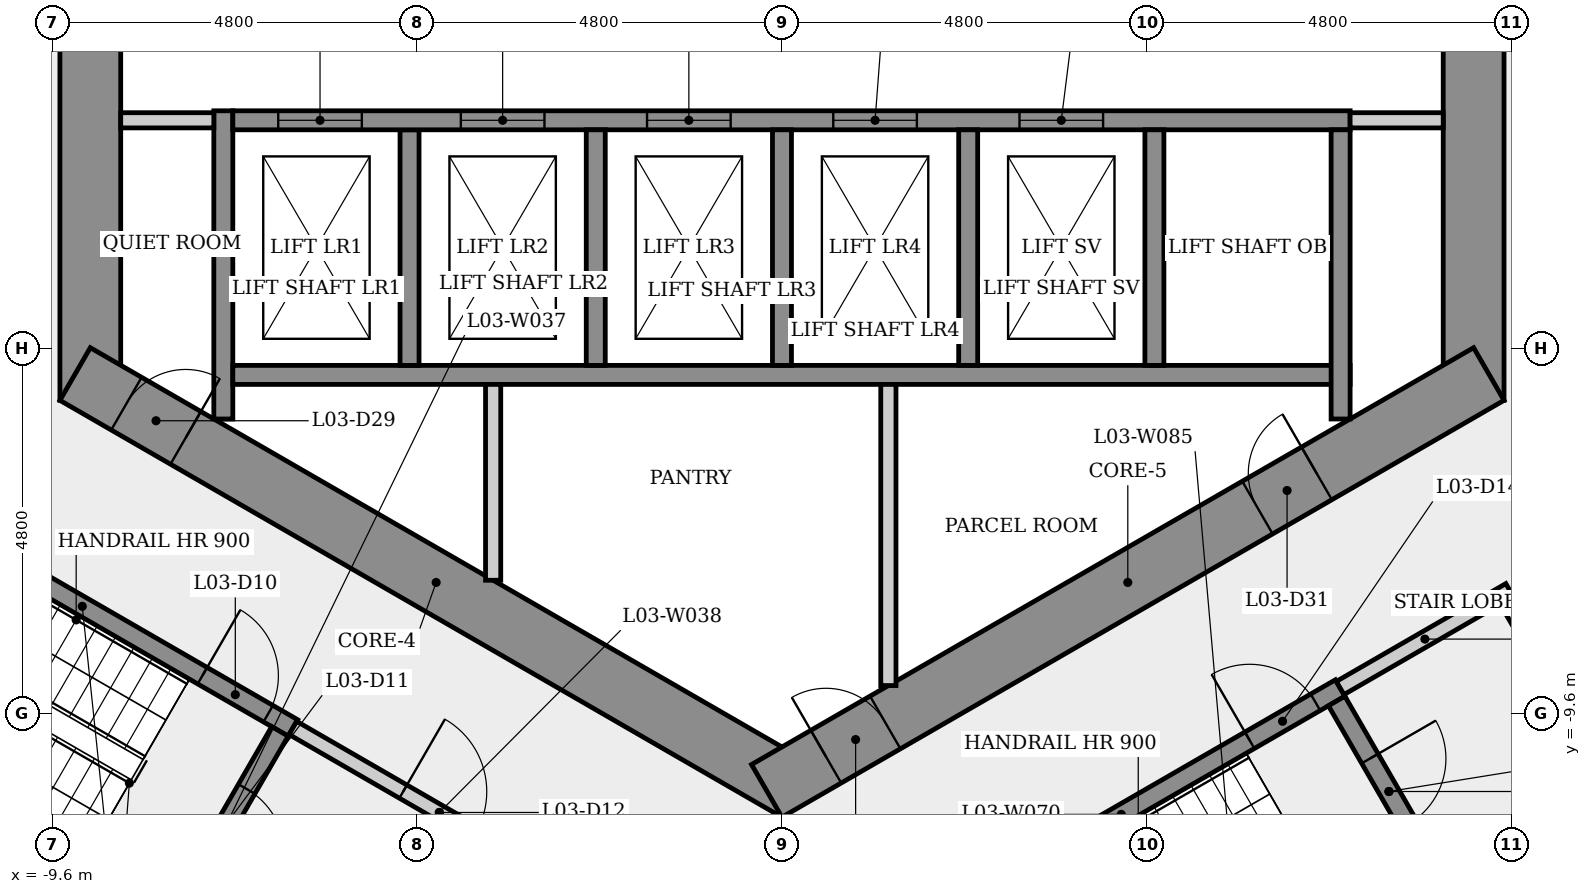
"""IFC4 building model, lengths in metres.
Left out: names, types, materials, properties, quantities, classifications, styles, units other than length and angle.
Written with IfcOpenShell. Run it as: python <this file> out.ifc"""

import sys

from ifc_helpers import new_model, si_unit, direction, frame, frame_2d, origin, place, context, subcontext, project, spatial, rectangle, extrude, element, fill, save


model = new_model("IFC4")
c1 = context("Model", 3, precision=1e-05, world=origin(), true_north=direction((0.0, 1.0)))
c2 = subcontext(c1, "Body", "Model", "MODEL_VIEW")
j1 = project(units=[si_unit("LENGTHUNIT", "METRE"), si_unit("PLANEANGLEUNIT", "RADIAN")], contexts=[c1])
p1 = place(None, origin())
s1 = spatial("IfcSite", under=j1, at=p1, CompositionType="ELEMENT")
p2 = place(p1, origin())
s2 = spatial("IfcBuilding", under=s1, at=p2, CompositionType="ELEMENT")
p3 = place(p2, frame((0.0, 0.0, 16.0)))
s3 = spatial("IfcBuildingStorey", under=s2, at=p3, CompositionType="ELEMENT", Elevation=16.0)
p4 = place(p3, frame((9.1, -5.485, 0.0), z_axis=(0.0, 0.0, 1.0), x_axis=(0.0, 1.0, 0.0)))
e1 = element("IfcWall", 1, at=p4, inside=s3, PredefinedType="SHEAR", context=c2, shape_type="SweptSolid", body=[
    extrude(rectangle(XDim=10.97, YDim=0.8, at=frame_2d((5.485, 0.0))), origin(), (0.0, 0.0, 1.0), 4.5),
])
p5 = place(p4, frame((4.685, 0.0, 0.0)))
e2 = element("IfcOpeningElement", 2, at=p5, cuts=e1, PredefinedType="OPENING", context=c2, shape_type="SweptSolid", body=[
    extrude(rectangle(XDim=1.6, YDim=2.1, at=frame_2d((0.8, 1.05))), frame((0.0, 0.41, 0.0), z_axis=(0.0, -1.0, 0.0), x_axis=(1.0, 0.0, 0.0)), (0.0, 0.0, 1.0), 0.82),
])
p6 = place(p3, frame((-9.1, 5.485, 0.0), z_axis=(0.0, 0.0, 1.0), x_axis=(0.0, -1.0, 0.0)))
e3 = element("IfcWall", 3, at=p6, inside=s3, PredefinedType="SHEAR", context=c2, shape_type="SweptSolid", body=[
    extrude(rectangle(XDim=10.97, YDim=0.8, at=frame_2d((5.485, 0.0))), origin(), (0.0, 0.0, 1.0), 4.5),
])
p7 = place(p6, frame((4.685, 0.0, 0.0)))
e4 = element("IfcOpeningElement", 4, at=p7, cuts=e3, PredefinedType="OPENING", context=c2, shape_type="SweptSolid", body=[
    extrude(rectangle(XDim=1.6, YDim=2.1, at=frame_2d((0.8, 1.05))), frame((0.0, 0.41, 0.0), z_axis=(0.0, -1.0, 0.0), x_axis=(1.0, 0.0, 0.0)), (0.0, 0.0, 1.0), 0.82),
])
p8 = place(p3, frame((-9.3, -5.138, 0.0), z_axis=(0.0, 0.0, 1.0), x_axis=(0.866023993627, -0.500002442456, 0.0)))
e5 = element("IfcWall", 5, at=p8, inside=s3, PredefinedType="SHEAR", context=c2, shape_type="SweptSolid", body=[
    extrude(rectangle(XDim=10.97, YDim=0.8, at=frame_2d((5.485, 0.0))), origin(), (0.0, 0.0, 1.0), 4.5),
])
p9 = place(p8, frame((0.78, 0.0, 0.0)))
e6 = element("IfcOpeningElement", 6, at=p9, cuts=e5, PredefinedType="OPENING", context=c2, shape_type="SweptSolid", body=[
    extrude(rectangle(XDim=0.9, YDim=2.1, at=frame_2d((0.45, 1.05))), frame((0.0, 0.41, 0.0), z_axis=(0.0, -1.0, 0.0), x_axis=(1.0, 0.0, 0.0)), (0.0, 0.0, 1.0), 0.82),
])
p10 = place(p3, frame((-0.2, -10.623, 0.0), z_axis=(0.0, 0.0, 1.0), x_axis=(0.866023993627, 0.500002442456, 0.0)))
e7 = element("IfcWall", 7, at=p10, inside=s3, PredefinedType="SHEAR", context=c2, shape_type="SweptSolid", body=[
    extrude(rectangle(XDim=10.97, YDim=0.8, at=frame_2d((5.485, 0.0))), origin(), (0.0, 0.0, 1.0), 4.5),
])
p11 = place(p10, frame((0.9, 0.0, 0.0)))
e8 = element("IfcOpeningElement", 8, at=p11, cuts=e7, PredefinedType="OPENING", context=c2, shape_type="SweptSolid", body=[
    extrude(rectangle(XDim=0.9, YDim=2.1, at=frame_2d((0.45, 1.05))), frame((0.0, 0.41, 0.0), z_axis=(0.0, -1.0, 0.0), x_axis=(1.0, 0.0, 0.0)), (0.0, 0.0, 1.0), 0.82),
])
p12 = place(p10, frame((7.455, 0.0, 0.0)))
e9 = element("IfcOpeningElement", 9, at=p12, cuts=e7, PredefinedType="OPENING", context=c2, shape_type="SweptSolid", body=[
    extrude(rectangle(XDim=0.9, YDim=2.1, at=frame_2d((0.45, 1.05))), frame((0.0, 0.41, 0.0), z_axis=(0.0, -1.0, 0.0), x_axis=(1.0, 0.0, 0.0)), (0.0, 0.0, 1.0), 0.82),
])
p13 = place(p3, frame((-11.977, -6.595, 0.0), z_axis=(0.0, 0.0, 1.0), x_axis=(0.866025499775, -0.499999833739, 0.0)))
e10 = element("IfcWall", 10, at=p13, inside=s3, PredefinedType="SHEAR", context=c2, shape_type="SweptSolid", body=[
    extrude(rectangle(XDim=6.4, YDim=0.25, at=frame_2d((3.2, 0.0))), origin(), (0.0, 0.0, 1.0), 4.05),
])
p14 = place(p13, frame((5.025, 0.0, 0.0)))
e11 = element("IfcOpeningElement", 11, at=p14, cuts=e10, PredefinedType="OPENING", context=c2, shape_type="SweptSolid", body=[
    extrude(rectangle(XDim=1.0, YDim=2.1, at=frame_2d((0.5, 1.05))), frame((0.0, 0.135, 0.0), z_axis=(0.0, -1.0, 0.0), x_axis=(1.0, 0.0, 0.0)), (0.0, 0.0, 1.0), 0.27),
])
p15 = place(p3, frame((-7.935, -12.393, 0.0), z_axis=(0.0, 0.0, 1.0), x_axis=(-0.866025499775, 0.499999833739, 0.0)))
e12 = element("IfcWall", 12, at=p15, inside=s3, PredefinedType="SHEAR", context=c2, shape_type="SweptSolid", body=[
    extrude(rectangle(XDim=6.4, YDim=0.25, at=frame_2d((3.2, 0.0))), origin(), (0.0, 0.0, 1.0), 4.05),
])
p16 = place(p3, frame((-7.35, -5.73, 0.0), z_axis=(0.0, 0.0, 1.0), x_axis=(0.0, 1.0, 0.0)))
e13 = element("IfcWall", 13, at=p16, inside=s3, PredefinedType="SHEAR", context=c2, shape_type="SweptSolid", body=[
    extrude(rectangle(XDim=4.055, YDim=0.25, at=frame_2d((2.028, 0.0))), origin(), (0.0, 0.0, 1.0), 4.05),
])
p17 = place(p3, frame((-7.475, -1.8, 0.0), z_axis=(0.0, 0.0, 1.0), x_axis=(-1.0, 0.0, 0.0)))
e14 = element("IfcWall", 14, at=p17, inside=s3, PredefinedType="PARTITIONING", context=c2, shape_type="SweptSolid", body=[
    extrude(rectangle(XDim=1.225, YDim=0.2, at=frame_2d((0.613, 0.0))), origin(), (0.0, 0.0, 1.0), 4.05),
])
p18 = place(p3, frame((-6.605, -9.841, 0.0), z_axis=(0.0, 0.0, 1.0), x_axis=(-0.499996545922, -0.866027397988, 0.0)))
e15 = element("IfcWall", 15, at=p18, inside=s3, PredefinedType="SHEAR", context=c2, shape_type="SweptSolid", body=[
    extrude(rectangle(XDim=2.75, YDim=0.25, at=frame_2d((1.375, 0.0))), origin(), (0.0, 0.0, 1.0), 4.05),
])
p19 = place(p18, frame((0.875, 0.0, 0.0)))
e16 = element("IfcOpeningElement", 16, at=p19, cuts=e15, PredefinedType="OPENING", context=c2, shape_type="SweptSolid", body=[
    extrude(rectangle(XDim=1.0, YDim=2.1, at=frame_2d((0.5, 1.05))), frame((0.0, 0.135, 0.0), z_axis=(0.0, -1.0, 0.0), x_axis=(1.0, 0.0, 0.0)), (0.0, 0.0, 1.0), 0.27),
])
p20 = place(p3, frame((-6.435, -9.795, 0.0), z_axis=(0.0, 0.0, 1.0), x_axis=(0.866012907634, -0.500021643343, 0.0)))
e17 = element("IfcWall", 17, at=p20, inside=s3, PredefinedType="PARTITIONING", context=c2, shape_type="SweptSolid", body=[
    extrude(rectangle(XDim=4.45, YDim=0.2, at=frame_2d((2.225, 0.0))), origin(), (0.0, 0.0, 1.0), 4.05),
])
p21 = place(p20, frame((1.675, 0.0, 0.0)))
e18 = element("IfcOpeningElement", 18, at=p21, cuts=e17, PredefinedType="OPENING", context=c2, shape_type="SweptSolid", body=[
    extrude(rectangle(XDim=1.1, YDim=2.1, at=frame_2d((0.55, 1.05))), frame((0.0, 0.11, 0.0), z_axis=(0.0, -1.0, 0.0), x_axis=(1.0, 0.0, 0.0)), (0.0, 0.0, 1.0), 0.22),
])
p22 = place(p3, frame((-7.225, -5.15, 0.0), z_axis=(0.0, 0.0, 1.0), x_axis=(1.0, 0.0, 0.0)))
e19 = element("IfcWall", 19, at=p22, inside=s3, PredefinedType="SHEAR", context=c2, shape_type="SweptSolid", body=[
    extrude(rectangle(XDim=14.7, YDim=0.25, at=frame_2d((7.35, 0.0))), origin(), (0.0, 0.0, 1.0), 4.05),
])
p23 = place(p3, frame((-4.9, -1.925, 0.0), z_axis=(0.0, 0.0, 1.0), x_axis=(0.0, -1.0, 0.0)))
e20 = element("IfcWall", 20, at=p23, inside=s3, PredefinedType="SHEAR", context=c2, shape_type="SweptSolid", body=[
    extrude(rectangle(XDim=3.1, YDim=0.25, at=frame_2d((1.55, 0.0))), origin(), (0.0, 0.0, 1.0), 4.5),
])
p24 = place(p3, frame((-7.225, -1.8, 0.0), z_axis=(0.0, 0.0, 1.0), x_axis=(1.0, 0.0, 0.0)))
e21 = element("IfcWall", 21, at=p24, inside=s3, PredefinedType="SHEAR", context=c2, shape_type="SweptSolid", body=[
    extrude(rectangle(XDim=14.7, YDim=0.25, at=frame_2d((7.35, 0.0))), origin(), (0.0, 0.0, 1.0), 4.05),
])
p25 = place(p24, frame((0.597, 0.0, 0.0)))
e22 = element("IfcOpeningElement", 22, at=p25, cuts=e21, PredefinedType="OPENING", context=c2, shape_type="SweptSolid", body=[
    extrude(rectangle(XDim=1.1, YDim=2.1, at=frame_2d((0.55, 1.05))), frame((0.0, 0.135, 0.0), z_axis=(0.0, -1.0, 0.0), x_axis=(1.0, 0.0, 0.0)), (0.0, 0.0, 1.0), 0.27),
])
p26 = place(p24, frame((3.0, 0.0, 0.0)))
e23 = element("IfcOpeningElement", 23, at=p26, cuts=e21, PredefinedType="OPENING", context=c2, shape_type="SweptSolid", body=[
    extrude(rectangle(XDim=1.1, YDim=2.1, at=frame_2d((0.55, 1.05))), frame((0.0, 0.135, 0.0), z_axis=(0.0, -1.0, 0.0), x_axis=(1.0, 0.0, 0.0)), (0.0, 0.0, 1.0), 0.27),
])
p27 = place(p24, frame((5.45, 0.0, 0.0)))
e24 = element("IfcOpeningElement", 24, at=p27, cuts=e21, PredefinedType="OPENING", context=c2, shape_type="SweptSolid", body=[
    extrude(rectangle(XDim=1.1, YDim=2.1, at=frame_2d((0.55, 1.05))), frame((0.0, 0.135, 0.0), z_axis=(0.0, -1.0, 0.0), x_axis=(1.0, 0.0, 0.0)), (0.0, 0.0, 1.0), 0.27),
])
p28 = place(p24, frame((7.9, 0.0, 0.0)))
e25 = element("IfcOpeningElement", 25, at=p28, cuts=e21, PredefinedType="OPENING", context=c2, shape_type="SweptSolid", body=[
    extrude(rectangle(XDim=1.1, YDim=2.1, at=frame_2d((0.55, 1.05))), frame((0.0, 0.135, 0.0), z_axis=(0.0, -1.0, 0.0), x_axis=(1.0, 0.0, 0.0)), (0.0, 0.0, 1.0), 0.27),
])
p29 = place(p24, frame((10.35, 0.0, 0.0)))
e26 = element("IfcOpeningElement", 26, at=p29, cuts=e21, PredefinedType="OPENING", context=c2, shape_type="SweptSolid", body=[
    extrude(rectangle(XDim=1.1, YDim=2.1, at=frame_2d((0.55, 1.05))), frame((0.0, 0.135, 0.0), z_axis=(0.0, -1.0, 0.0), x_axis=(1.0, 0.0, 0.0)), (0.0, 0.0, 1.0), 0.27),
])
p30 = place(p3, frame((-3.8, -5.275, 0.0), z_axis=(0.0, 0.0, 1.0), x_axis=(0.0, -1.0, 0.0)))
e27 = element("IfcWall", 27, at=p30, inside=s3, PredefinedType="PARTITIONING", context=c2, shape_type="SweptSolid", body=[
    extrude(rectangle(XDim=2.577, YDim=0.2, at=frame_2d((1.289, 0.0))), origin(), (0.0, 0.0, 1.0), 4.05),
])
for number, where, z_axis, x_axis in (
    (28, (-2.45, -1.925, 0.0), (0.0, 0.0, 1.0), (0.0, -1.0, 0.0)),
    (29, (0.0, -1.925, 0.0), (0.0, 0.0, 1.0), (0.0, -1.0, 0.0)),
):
    element("IfcWall", number, at=place(p3, frame(where, z_axis=z_axis, x_axis=x_axis)), inside=s3, PredefinedType="SHEAR", context=c2, shape_type="SweptSolid", body=[
        extrude(rectangle(XDim=3.1, YDim=0.25, at=frame_2d((1.55, 0.0))), origin(), (0.0, 0.0, 1.0), 4.5),
    ])
p31 = place(p3, frame((1.4, -5.275, 0.0), z_axis=(0.0, 0.0, 1.0), x_axis=(0.0, -1.0, 0.0)))
e30 = element("IfcWall", 30, at=p31, inside=s3, PredefinedType="PARTITIONING", context=c2, shape_type="SweptSolid", body=[
    extrude(rectangle(XDim=3.963, YDim=0.2, at=frame_2d((1.981, 0.0))), origin(), (0.0, 0.0, 1.0), 4.05),
])
p32 = place(p3, frame((1.585, -12.595, 0.0), z_axis=(0.0, 0.0, 1.0), x_axis=(0.866036417653, 0.499980922934, 0.0)))
e31 = element("IfcWall", 31, at=p32, inside=s3, PredefinedType="SHEAR", context=c2, shape_type="SweptSolid", body=[
    extrude(rectangle(XDim=6.65, YDim=0.25, at=frame_2d((3.325, 0.0))), origin(), (0.0, 0.0, 1.0), 4.05),
])
p33 = place(p32, frame((5.275, 0.0, 0.0)))
e32 = element("IfcOpeningElement", 32, at=p33, cuts=e31, PredefinedType="OPENING", context=c2, shape_type="SweptSolid", body=[
    extrude(rectangle(XDim=1.0, YDim=2.1, at=frame_2d((0.5, 1.05))), frame((0.0, 0.135, 0.0), z_axis=(0.0, -1.0, 0.0), x_axis=(1.0, 0.0, 0.0)), (0.0, 0.0, 1.0), 0.27),
])
for number, where, z_axis, x_axis in (
    (33, (2.45, -1.925, 0.0), (0.0, 0.0, 1.0), (0.0, -1.0, 0.0)),
    (34, (4.9, -1.925, 0.0), (0.0, 0.0, 1.0), (0.0, -1.0, 0.0)),
):
    element("IfcWall", number, at=place(p3, frame(where, z_axis=z_axis, x_axis=x_axis)), inside=s3, PredefinedType="SHEAR", context=c2, shape_type="SweptSolid", body=[
        extrude(rectangle(XDim=3.1, YDim=0.25, at=frame_2d((1.55, 0.0))), origin(), (0.0, 0.0, 1.0), 4.5),
    ])
p34 = place(p3, frame((7.298, -9.441, 0.0), z_axis=(0.0, 0.0, 1.0), x_axis=(0.500034990121, -0.866005201286, 0.0)))
e35 = element("IfcWall", 35, at=p34, inside=s3, PredefinedType="SHEAR", context=c2, shape_type="SweptSolid", body=[
    extrude(rectangle(XDim=2.75, YDim=0.25, at=frame_2d((1.375, 0.0))), origin(), (0.0, 0.0, 1.0), 4.05),
])
p35 = place(p34, frame((0.875, 0.0, 0.0)))
e36 = element("IfcOpeningElement", 36, at=p35, cuts=e35, PredefinedType="OPENING", context=c2, shape_type="SweptSolid", body=[
    extrude(rectangle(XDim=1.0, YDim=2.1, at=frame_2d((0.5, 1.05))), frame((0.0, 0.135, 0.0), z_axis=(0.0, -1.0, 0.0), x_axis=(1.0, 0.0, 0.0)), (0.0, 0.0, 1.0), 0.27),
])
p36 = place(p3, frame((7.344, -9.27, 0.0), z_axis=(0.0, 0.0, 1.0), x_axis=(0.866005588531, 0.500034319456, 0.0)))
e37 = element("IfcWall", 37, at=p36, inside=s3, PredefinedType="PARTITIONING", context=c2, shape_type="SweptSolid", body=[
    extrude(rectangle(XDim=2.575, YDim=0.2, at=frame_2d((1.288, 0.0))), origin(), (0.0, 0.0, 1.0), 4.05),
])
p37 = place(p3, frame((7.35, -1.925, 0.0), z_axis=(0.0, 0.0, 1.0), x_axis=(0.0, -1.0, 0.0)))
e38 = element("IfcWall", 38, at=p37, inside=s3, PredefinedType="SHEAR", context=c2, shape_type="SweptSolid", body=[
    extrude(rectangle(XDim=3.805, YDim=0.25, at=frame_2d((1.903, 0.0))), origin(), (0.0, 0.0, 1.0), 4.05),
])
p38 = place(p3, frame((8.7, -1.8, 0.0), z_axis=(0.0, 0.0, 1.0), x_axis=(-1.0, 0.0, 0.0)))
e39 = element("IfcWall", 39, at=p38, inside=s3, PredefinedType="PARTITIONING", context=c2, shape_type="SweptSolid", body=[
    extrude(rectangle(XDim=1.225, YDim=0.2, at=frame_2d((0.613, 0.0))), origin(), (0.0, 0.0, 1.0), 4.05),
])
p39 = place(p3, frame((9.537, -8.119, 0.0), z_axis=(0.0, 0.0, 1.0), x_axis=(0.499990139034, -0.866031096941, 0.0)))
e40 = element("IfcWall", 40, at=p39, inside=s3, PredefinedType="PARTITIONING", context=c2, shape_type="SweptSolid", body=[
    extrude(rectangle(XDim=3.0, YDim=0.2, at=frame_2d((1.5, 0.0))), origin(), (0.0, 0.0, 1.0), 4.05),
])
p40 = place(p39, frame((0.935, 0.0, 0.0)))
e41 = element("IfcOpeningElement", 41, at=p40, cuts=e40, PredefinedType="OPENING", context=c2, shape_type="SweptSolid", body=[
    extrude(rectangle(XDim=1.0, YDim=2.1, at=frame_2d((0.5, 1.05))), frame((0.0, 0.11, 0.0), z_axis=(0.0, -1.0, 0.0), x_axis=(1.0, 0.0, 0.0)), (0.0, 0.0, 1.0), 0.22),
])
p41 = place(p3, frame((10.901, -10.681, 0.0), z_axis=(0.0, 0.0, 1.0), x_axis=(-0.866009402589, -0.500027713859, 0.0)))
e42 = element("IfcWall", 42, at=p41, inside=s3, PredefinedType="PARTITIONING", context=c2, shape_type="SweptSolid", body=[
    extrude(rectangle(XDim=2.1, YDim=0.2, at=frame_2d((1.05, 0.0))), origin(), (0.0, 0.0, 1.0), 4.05),
])
p42 = place(p25, origin())
e43 = element("IfcDoor", 43, at=p42, inside=s3, OperationType="SLIDING_TO_LEFT", PredefinedType="DOOR", context=c2, shape_type="SweptSolid", body=[
    extrude(rectangle(XDim=1.1, YDim=2.1, at=frame_2d((0.55, 1.05))), frame((0.0, 0.025, 0.0), z_axis=(0.0, -1.0, 0.0), x_axis=(1.0, 0.0, 0.0)), (0.0, 0.0, 1.0), 0.05),
])
fill(e22, e43)
p43 = place(p26, origin())
e44 = element("IfcDoor", 44, at=p43, inside=s3, OperationType="SLIDING_TO_LEFT", PredefinedType="DOOR", context=c2, shape_type="SweptSolid", body=[
    extrude(rectangle(XDim=1.1, YDim=2.1, at=frame_2d((0.55, 1.05))), frame((0.0, 0.025, 0.0), z_axis=(0.0, -1.0, 0.0), x_axis=(1.0, 0.0, 0.0)), (0.0, 0.0, 1.0), 0.05),
])
fill(e23, e44)
p44 = place(p27, origin())
e45 = element("IfcDoor", 45, at=p44, inside=s3, OperationType="SLIDING_TO_LEFT", PredefinedType="DOOR", context=c2, shape_type="SweptSolid", body=[
    extrude(rectangle(XDim=1.1, YDim=2.1, at=frame_2d((0.55, 1.05))), frame((0.0, 0.025, 0.0), z_axis=(0.0, -1.0, 0.0), x_axis=(1.0, 0.0, 0.0)), (0.0, 0.0, 1.0), 0.05),
])
fill(e24, e45)
p45 = place(p28, origin())
e46 = element("IfcDoor", 46, at=p45, inside=s3, OperationType="SLIDING_TO_LEFT", PredefinedType="DOOR", context=c2, shape_type="SweptSolid", body=[
    extrude(rectangle(XDim=1.1, YDim=2.1, at=frame_2d((0.55, 1.05))), frame((0.0, 0.025, 0.0), z_axis=(0.0, -1.0, 0.0), x_axis=(1.0, 0.0, 0.0)), (0.0, 0.0, 1.0), 0.05),
])
fill(e25, e46)
p46 = place(p29, origin())
e47 = element("IfcDoor", 47, at=p46, inside=s3, OperationType="SLIDING_TO_LEFT", PredefinedType="DOOR", context=c2, shape_type="SweptSolid", body=[
    extrude(rectangle(XDim=1.1, YDim=2.1, at=frame_2d((0.55, 1.05))), frame((0.0, 0.025, 0.0), z_axis=(0.0, -1.0, 0.0), x_axis=(1.0, 0.0, 0.0)), (0.0, 0.0, 1.0), 0.05),
])
fill(e26, e47)
p47 = place(p14, origin())
e48 = element("IfcDoor", 48, at=p47, inside=s3, OperationType="SINGLE_SWING_LEFT", PredefinedType="DOOR", context=c2, shape_type="SweptSolid", body=[
    extrude(rectangle(XDim=1.0, YDim=2.1, at=frame_2d((0.5, 1.05))), frame((0.0, 0.025, 0.0), z_axis=(0.0, -1.0, 0.0), x_axis=(1.0, 0.0, 0.0)), (0.0, 0.0, 1.0), 0.05),
])
fill(e11, e48)
p48 = place(p19, origin())
e49 = element("IfcDoor", 49, at=p48, inside=s3, OperationType="SINGLE_SWING_RIGHT", PredefinedType="DOOR", context=c2, shape_type="SweptSolid", body=[
    extrude(rectangle(XDim=1.0, YDim=2.1, at=frame_2d((0.5, 1.05))), frame((0.0, 0.025, 0.0), z_axis=(0.0, -1.0, 0.0), x_axis=(1.0, 0.0, 0.0)), (0.0, 0.0, 1.0), 0.05),
])
fill(e16, e49)
p49 = place(p21, origin())
e50 = element("IfcDoor", 50, at=p49, inside=s3, OperationType="SINGLE_SWING_LEFT", PredefinedType="DOOR", context=c2, shape_type="SweptSolid", body=[
    extrude(rectangle(XDim=1.1, YDim=2.1, at=frame_2d((0.55, 1.05))), frame((0.0, 0.025, 0.0), z_axis=(0.0, -1.0, 0.0), x_axis=(1.0, 0.0, 0.0)), (0.0, 0.0, 1.0), 0.05),
])
fill(e18, e50)
p50 = place(p33, origin())
e51 = element("IfcDoor", 51, at=p50, inside=s3, OperationType="SINGLE_SWING_LEFT", PredefinedType="DOOR", context=c2, shape_type="SweptSolid", body=[
    extrude(rectangle(XDim=1.0, YDim=2.1, at=frame_2d((0.5, 1.05))), frame((0.0, 0.025, 0.0), z_axis=(0.0, -1.0, 0.0), x_axis=(1.0, 0.0, 0.0)), (0.0, 0.0, 1.0), 0.05),
])
fill(e32, e51)
p51 = place(p35, origin())
e52 = element("IfcDoor", 52, at=p51, inside=s3, OperationType="SINGLE_SWING_LEFT", PredefinedType="DOOR", context=c2, shape_type="SweptSolid", body=[
    extrude(rectangle(XDim=1.0, YDim=2.1, at=frame_2d((0.5, 1.05))), frame((0.0, 0.025, 0.0), z_axis=(0.0, -1.0, 0.0), x_axis=(1.0, 0.0, 0.0)), (0.0, 0.0, 1.0), 0.05),
])
fill(e36, e52)
p52 = place(p9, origin())
e53 = element("IfcDoor", 53, at=p52, inside=s3, OperationType="SINGLE_SWING_RIGHT", PredefinedType="DOOR", context=c2, shape_type="SweptSolid", body=[
    extrude(rectangle(XDim=0.9, YDim=2.1, at=frame_2d((0.45, 1.05))), frame((0.0, 0.025, 0.0), z_axis=(0.0, -1.0, 0.0), x_axis=(1.0, 0.0, 0.0)), (0.0, 0.0, 1.0), 0.05),
])
fill(e6, e53)
p53 = place(p11, origin())
e54 = element("IfcDoor", 54, at=p53, inside=s3, OperationType="SINGLE_SWING_LEFT", PredefinedType="DOOR", context=c2, shape_type="SweptSolid", body=[
    extrude(rectangle(XDim=0.9, YDim=2.1, at=frame_2d((0.45, 1.05))), frame((0.0, 0.025, 0.0), z_axis=(0.0, -1.0, 0.0), x_axis=(1.0, 0.0, 0.0)), (0.0, 0.0, 1.0), 0.05),
])
fill(e8, e54)
p54 = place(p12, origin())
e55 = element("IfcDoor", 55, at=p54, inside=s3, OperationType="SINGLE_SWING_RIGHT", PredefinedType="DOOR", context=c2, shape_type="SweptSolid", body=[
    extrude(rectangle(XDim=0.9, YDim=2.1, at=frame_2d((0.45, 1.05))), frame((0.0, 0.025, 0.0), z_axis=(0.0, -1.0, 0.0), x_axis=(1.0, 0.0, 0.0)), (0.0, 0.0, 1.0), 0.05),
])
fill(e9, e55)
save(model, sys.argv[1])
